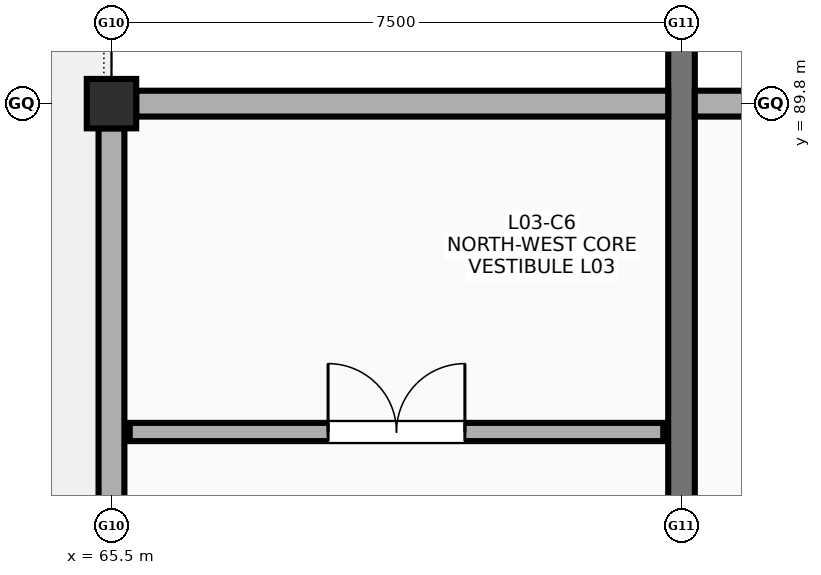
"""IFC4 building model, lengths in metres.
Left out: names, types, materials, properties, quantities, classifications, styles, units other than length and angle.
Written with IfcOpenShell. Run it as: python <this file> out.ifc"""

import sys

from ifc_helpers import new_model, si_unit, direction, frame, frame_2d, origin, origin_2d, place, context, subcontext, project, spatial, rectangle, extrude, element, fill, save


model = new_model("IFC4")
c1 = context("Model", 3, precision=1e-05, world=origin(), true_north=direction((0.0, 1.0)))
c2 = subcontext(c1, "Body", "Model", "MODEL_VIEW")
j1 = project(units=[si_unit("LENGTHUNIT", "METRE"), si_unit("PLANEANGLEUNIT", "RADIAN")], contexts=[c1])
p1 = place(None, origin())
s1 = spatial("IfcSite", under=j1, at=p1, CompositionType="ELEMENT")
p2 = place(p1, origin())
s2 = spatial("IfcBuilding", under=s1, at=p2, CompositionType="ELEMENT")
p3 = place(p2, frame((0.0, 0.0, 14.2)))
s3 = spatial("IfcBuildingStorey", under=s2, at=p3, CompositionType="ELEMENT", Elevation=14.2)
p4 = place(p3, frame((65.5, 89.8, 0.0), z_axis=(0.0, 0.0, 1.0), x_axis=(1.0, 0.0, 0.0)))
e1 = element("IfcColumn", 1, at=p4, inside=s3, PredefinedType="COLUMN", context=c2, shape_type="SweptSolid", body=[
    extrude(rectangle(XDim=0.65, YDim=0.65, at=origin_2d()), origin(), (0.0, 0.0, 1.0), 3.8),
])
p5 = place(p3, frame((73.0, 73.09, 0.0), z_axis=(0.0, 0.0, 1.0), x_axis=(0.0, 1.0, 0.0)))
e2 = element("IfcWall", 2, at=p5, inside=s3, PredefinedType="SHEAR", context=c2, shape_type="SweptSolid", body=[
    extrude(rectangle(XDim=25.02, YDim=0.35, at=frame_2d((12.51, 0.0))), origin(), (0.0, 0.0, 1.0), 3.8),
])
p6 = place(p3, frame((65.5, 81.525, 0.0), z_axis=(0.0, 0.0, 1.0), x_axis=(0.0, 1.0, 0.0)))
e3 = element("IfcWall", 3, at=p6, inside=s3, PredefinedType="SOLIDWALL", context=c2, shape_type="SweptSolid", body=[
    extrude(rectangle(XDim=7.95, YDim=0.34, at=frame_2d((3.975, 0.0))), origin(), (0.0, 0.0, 1.0), 2.35),
])
p7 = place(p3, frame((65.825, 89.8, 0.0), z_axis=(0.0, 0.0, 1.0), x_axis=(1.0, 0.0, 0.0)))
e4 = element("IfcWall", 4, at=p7, inside=s3, PredefinedType="SOLIDWALL", context=c2, shape_type="SweptSolid", body=[
    extrude(rectangle(XDim=7.0, YDim=0.34, at=frame_2d((3.5, 0.0))), origin(), (0.0, 0.0, 1.0), 2.35),
])
p8 = place(p3, frame((73.175, 89.8, 0.0), z_axis=(0.0, 0.0, 1.0), x_axis=(1.0, 0.0, 0.0)))
e5 = element("IfcWall", 5, at=p8, inside=s3, PredefinedType="SOLIDWALL", context=c2, shape_type="SweptSolid", body=[
    extrude(rectangle(XDim=29.65, YDim=0.34, at=frame_2d((14.825, 0.0))), origin(), (0.0, 0.0, 1.0), 2.35),
])
p9 = place(p3, frame((65.74, 85.48, 0.0), z_axis=(0.0, 0.0, 1.0), x_axis=(1.0, 0.0, 0.0)))
e6 = element("IfcWall", 6, at=p9, inside=s3, PredefinedType="SOLIDWALL", context=c2, shape_type="SweptSolid", body=[
    extrude(rectangle(XDim=7.02, YDim=0.24, at=frame_2d((3.51, 0.0))), origin(), (0.0, 0.0, 1.0), 2.7),
])
p10 = place(p9, frame((2.61, 0.0, 0.0)))
e7 = element("IfcOpeningElement", 7, at=p10, cuts=e6, PredefinedType="OPENING", context=c2, shape_type="SweptSolid", body=[
    extrude(rectangle(XDim=1.8, YDim=2.18, at=frame_2d((0.9, 1.09))), frame((0.0, 0.13, 0.0), z_axis=(0.0, -1.0, 0.0), x_axis=(1.0, 0.0, 0.0)), (0.0, 0.0, 1.0), 0.26),
])
p11 = place(p10, origin())
e8 = element("IfcDoor", 8, at=p11, inside=s3, OperationType="DOUBLE_DOOR_SINGLE_SWING", PredefinedType="DOOR", context=c2, shape_type="SweptSolid", body=[
    extrude(rectangle(XDim=1.8, YDim=2.18, at=frame_2d((0.9, 1.09))), frame((0.0, 0.025, 0.0), z_axis=(0.0, -1.0, 0.0), x_axis=(1.0, 0.0, 0.0)), (0.0, 0.0, 1.0), 0.05),
])
fill(e7, e8)
save(model, sys.argv[1])
